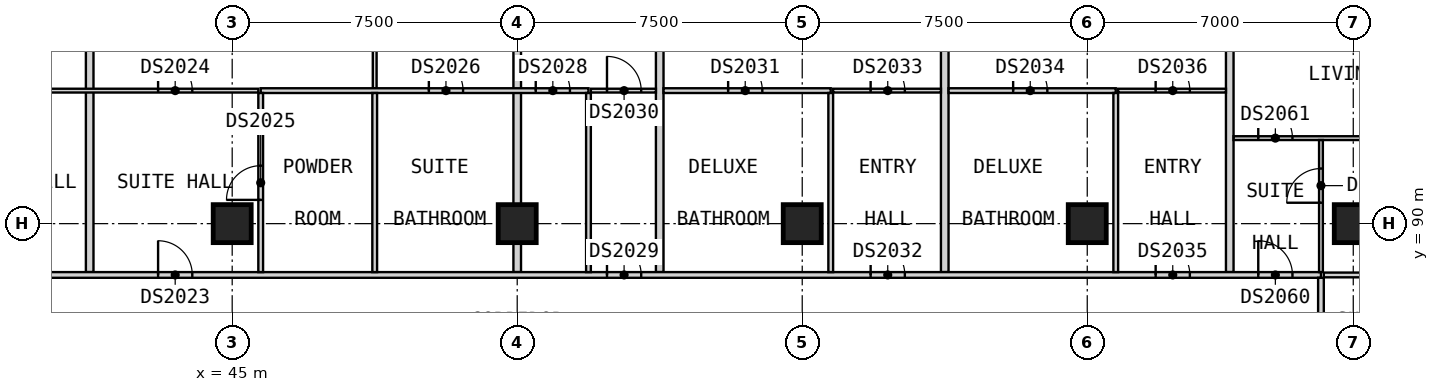
"""IFC4 building model, lengths in metres.
Left out: names, types, materials, properties, quantities, classifications, styles, units other than length and angle.
Written with IfcOpenShell. Run it as: python <this file> out.ifc"""

import sys

from ifc_helpers import new_model, si_unit, direction, frame, frame_2d, origin, origin_2d, place, context, subcontext, project, spatial, rectangle, extrude, element, fill, save


model = new_model("IFC4")
c1 = context("Model", 3, precision=1e-05, world=origin(), true_north=direction((0.0, 1.0)))
c2 = subcontext(c1, "Body", "Model", "MODEL_VIEW")
j1 = project(units=[si_unit("LENGTHUNIT", "METRE"), si_unit("PLANEANGLEUNIT", "RADIAN")], contexts=[c1])
p1 = place(None, origin())
s1 = spatial("IfcSite", under=j1, at=p1, CompositionType="ELEMENT")
p2 = place(p1, origin())
s2 = spatial("IfcBuilding", under=s1, at=p2, CompositionType="ELEMENT")
p3 = place(p2, frame((0.0, 0.0, 133.8)))
s3 = spatial("IfcBuildingStorey", under=s2, at=p3, CompositionType="ELEMENT", Elevation=133.8)
for number, where, z_axis, x_axis in (
    (1, (45.0, 90.0, 0.0), (0.0, 0.0, 1.0), (1.0, 0.0, 0.0)),
    (2, (52.5, 90.0, 0.0), (0.0, 0.0, 1.0), (1.0, 0.0, 0.0)),
    (3, (60.0, 90.0, 0.0), (0.0, 0.0, 1.0), (1.0, 0.0, 0.0)),
    (4, (67.5, 90.0, 0.0), (0.0, 0.0, 1.0), (1.0, 0.0, 0.0)),
    (5, (74.5, 90.0, 0.0), (0.0, 0.0, 1.0), (1.0, 0.0, 0.0)),
):
    element("IfcColumn", number, at=place(p3, frame(where, z_axis=z_axis, x_axis=x_axis)), inside=s3, PredefinedType="COLUMN", context=c2, shape_type="SweptSolid", body=[
        extrude(rectangle(XDim=1.0, YDim=1.0, at=origin_2d()), origin(), (0.0, 0.0, 1.0), 3.6),
    ])
p4 = place(p3, frame((41.25, 88.725, 0.0), z_axis=(0.0, 0.0, 1.0), x_axis=(0.0, 1.0, 0.0)))
e6 = element("IfcWall", 6, at=p4, inside=s3, PredefinedType="PARTITIONING", context=c2, shape_type="SweptSolid", body=[
    extrude(rectangle(XDim=11.715, YDim=0.2, at=frame_2d((5.857, 0.0))), origin(), (0.0, 0.0, 1.0), 3.35),
])
p5 = place(p3, frame((52.5, 88.725, 0.0), z_axis=(0.0, 0.0, 1.0), x_axis=(0.0, 1.0, 0.0)))
e7 = element("IfcWall", 7, at=p5, inside=s3, PredefinedType="PARTITIONING", context=c2, shape_type="SweptSolid", body=[
    extrude(rectangle(XDim=12.525, YDim=0.2, at=frame_2d((6.262, 0.0))), origin(), (0.0, 0.0, 1.0), 3.35),
])
for number, where, z_axis, x_axis in (
    (8, (56.25, 88.725, 0.0), (0.0, 0.0, 1.0), (0.0, 1.0, 0.0)),
    (9, (63.75, 88.725, 0.0), (0.0, 0.0, 1.0), (0.0, 1.0, 0.0)),
    (10, (71.25, 88.725, 0.0), (0.0, 0.0, 1.0), (0.0, 1.0, 0.0)),
):
    element("IfcWall", number, at=place(p3, frame(where, z_axis=z_axis, x_axis=x_axis)), inside=s3, PredefinedType="PARTITIONING", context=c2, shape_type="SweptSolid", body=[
        extrude(rectangle(XDim=11.715, YDim=0.2, at=frame_2d((5.857, 0.0))), origin(), (0.0, 0.0, 1.0), 3.35),
    ])
p6 = place(p3, frame((33.75, 88.65, 0.0), z_axis=(0.0, 0.0, 1.0), x_axis=(1.0, 0.0, 0.0)))
e11 = element("IfcWall", 11, at=p6, inside=s3, PredefinedType="PARTITIONING", context=c2, shape_type="SweptSolid", body=[
    extrude(rectangle(XDim=39.9, YDim=0.15, at=frame_2d((19.95, 0.0))), origin(), (0.0, 0.0, 1.0), 3.35),
])
p7 = place(p6, frame((5.175, 0.0, 0.0)))
e12 = element("IfcOpeningElement", 12, at=p7, cuts=e11, PredefinedType="OPENING", context=c2, shape_type="SweptSolid", body=[
    extrude(rectangle(XDim=0.9, YDim=2.1, at=frame_2d((0.45, 1.05))), frame((0.0, 0.085, 0.0), z_axis=(0.0, -1.0, 0.0), x_axis=(1.0, 0.0, 0.0)), (0.0, 0.0, 1.0), 0.17),
])
p8 = place(p6, frame((9.3, 0.0, 0.0)))
e13 = element("IfcOpeningElement", 13, at=p8, cuts=e11, PredefinedType="OPENING", context=c2, shape_type="SweptSolid", body=[
    extrude(rectangle(XDim=0.9, YDim=2.1, at=frame_2d((0.45, 1.05))), frame((0.0, 0.085, 0.0), z_axis=(0.0, -1.0, 0.0), x_axis=(1.0, 0.0, 0.0)), (0.0, 0.0, 1.0), 0.17),
])
p9 = place(p6, frame((21.113, 0.0, 0.0)))
e14 = element("IfcOpeningElement", 14, at=p9, cuts=e11, PredefinedType="OPENING", context=c2, shape_type="SweptSolid", body=[
    extrude(rectangle(XDim=0.9, YDim=2.1, at=frame_2d((0.45, 1.05))), frame((0.0, 0.085, 0.0), z_axis=(0.0, -1.0, 0.0), x_axis=(1.0, 0.0, 0.0)), (0.0, 0.0, 1.0), 0.17),
])
p10 = place(p6, frame((28.05, 0.0, 0.0)))
e15 = element("IfcOpeningElement", 15, at=p10, cuts=e11, PredefinedType="OPENING", context=c2, shape_type="SweptSolid", body=[
    extrude(rectangle(XDim=0.9, YDim=2.1, at=frame_2d((0.45, 1.05))), frame((0.0, 0.085, 0.0), z_axis=(0.0, -1.0, 0.0), x_axis=(1.0, 0.0, 0.0)), (0.0, 0.0, 1.0), 0.17),
])
p11 = place(p6, frame((35.55, 0.0, 0.0)))
e16 = element("IfcOpeningElement", 16, at=p11, cuts=e11, PredefinedType="OPENING", context=c2, shape_type="SweptSolid", body=[
    extrude(rectangle(XDim=0.9, YDim=2.1, at=frame_2d((0.45, 1.05))), frame((0.0, 0.085, 0.0), z_axis=(0.0, -1.0, 0.0), x_axis=(1.0, 0.0, 0.0)), (0.0, 0.0, 1.0), 0.17),
])
p12 = place(p6, frame((38.25, 0.0, 0.0)))
e17 = element("IfcOpeningElement", 17, at=p12, cuts=e11, PredefinedType="OPENING", context=c2, shape_type="SweptSolid", body=[
    extrude(rectangle(XDim=0.9, YDim=2.1, at=frame_2d((0.45, 1.05))), frame((0.0, 0.085, 0.0), z_axis=(0.0, -1.0, 0.0), x_axis=(1.0, 0.0, 0.0)), (0.0, 0.0, 1.0), 0.17),
])
p13 = place(p3, frame((73.65, 50.175, 0.0), z_axis=(0.0, 0.0, 1.0), x_axis=(0.0, 1.0, 0.0)))
e18 = element("IfcWall", 18, at=p13, inside=s3, PredefinedType="PARTITIONING", context=c2, shape_type="SweptSolid", body=[
    extrude(rectangle(XDim=38.4, YDim=0.15, at=frame_2d((19.2, 0.0))), origin(), (0.0, 0.0, 1.0), 3.35),
])
p14 = place(p13, frame((7.875, 0.0, 0.0)))
e19 = element("IfcOpeningElement", 19, at=p14, cuts=e18, PredefinedType="OPENING", context=c2, shape_type="SweptSolid", body=[
    extrude(rectangle(XDim=0.9, YDim=2.1, at=frame_2d((0.45, 1.05))), frame((0.0, 0.085, 0.0), z_axis=(0.0, -1.0, 0.0), x_axis=(1.0, 0.0, 0.0)), (0.0, 0.0, 1.0), 0.17),
])
p15 = place(p13, frame((12.188, 0.0, 0.0)))
e20 = element("IfcOpeningElement", 20, at=p15, cuts=e18, PredefinedType="OPENING", context=c2, shape_type="SweptSolid", body=[
    extrude(rectangle(XDim=0.9, YDim=2.1, at=frame_2d((0.45, 1.05))), frame((0.0, 0.085, 0.0), z_axis=(0.0, -1.0, 0.0), x_axis=(1.0, 0.0, 0.0)), (0.0, 0.0, 1.0), 0.17),
])
p16 = place(p13, frame((15.375, 0.0, 0.0)))
e21 = element("IfcOpeningElement", 21, at=p16, cuts=e18, PredefinedType="OPENING", context=c2, shape_type="SweptSolid", body=[
    extrude(rectangle(XDim=0.9, YDim=2.1, at=frame_2d((0.45, 1.05))), frame((0.0, 0.085, 0.0), z_axis=(0.0, -1.0, 0.0), x_axis=(1.0, 0.0, 0.0)), (0.0, 0.0, 1.0), 0.17),
])
p17 = place(p13, frame((30.375, 0.0, 0.0)))
e22 = element("IfcOpeningElement", 22, at=p17, cuts=e18, PredefinedType="OPENING", context=c2, shape_type="SweptSolid", body=[
    extrude(rectangle(XDim=0.9, YDim=2.1, at=frame_2d((0.45, 1.05))), frame((0.0, 0.085, 0.0), z_axis=(0.0, -1.0, 0.0), x_axis=(1.0, 0.0, 0.0)), (0.0, 0.0, 1.0), 0.17),
])
p18 = place(p13, frame((34.688, 0.0, 0.0)))
e23 = element("IfcOpeningElement", 23, at=p18, cuts=e18, PredefinedType="OPENING", context=c2, shape_type="SweptSolid", body=[
    extrude(rectangle(XDim=0.9, YDim=2.1, at=frame_2d((0.45, 1.05))), frame((0.0, 0.085, 0.0), z_axis=(0.0, -1.0, 0.0), x_axis=(1.0, 0.0, 0.0)), (0.0, 0.0, 1.0), 0.17),
])
p19 = place(p3, frame((71.35, 92.25, 0.0), z_axis=(0.0, 0.0, 1.0), x_axis=(1.0, 0.0, 0.0)))
e24 = element("IfcWall", 24, at=p19, inside=s3, PredefinedType="PARTITIONING", context=c2, shape_type="SweptSolid", body=[
    extrude(rectangle(XDim=7.35, YDim=0.1, at=frame_2d((3.675, 0.0))), origin(), (0.0, 0.0, 1.0), 3.35),
])
p20 = place(p19, frame((0.65, 0.0, 0.0)))
e25 = element("IfcOpeningElement", 25, at=p20, cuts=e24, PredefinedType="OPENING", context=c2, shape_type="SweptSolid", body=[
    extrude(rectangle(XDim=0.9, YDim=2.1, at=frame_2d((0.45, 1.05))), frame((0.0, 0.06, 0.0), z_axis=(0.0, -1.0, 0.0), x_axis=(1.0, 0.0, 0.0)), (0.0, 0.0, 1.0), 0.12),
])
p21 = place(p3, frame((33.812, 93.5, 0.0), z_axis=(0.0, 0.0, 1.0), x_axis=(1.0, 0.0, 0.0)))
e26 = element("IfcWall", 26, at=p21, inside=s3, PredefinedType="PARTITIONING", context=c2, shape_type="SweptSolid", body=[
    extrude(rectangle(XDim=11.875, YDim=0.1, at=frame_2d((5.938, 0.0))), origin(), (0.0, 0.0, 1.0), 3.35),
])
p22 = place(p21, frame((5.113, 0.0, 0.0)))
e27 = element("IfcOpeningElement", 27, at=p22, cuts=e26, PredefinedType="OPENING", context=c2, shape_type="SweptSolid", body=[
    extrude(rectangle(XDim=0.9, YDim=2.1, at=frame_2d((0.45, 1.05))), frame((0.0, 0.06, 0.0), z_axis=(0.0, -1.0, 0.0), x_axis=(1.0, 0.0, 0.0)), (0.0, 0.0, 1.0), 0.12),
])
p23 = place(p21, frame((9.238, 0.0, 0.0)))
e28 = element("IfcOpeningElement", 28, at=p23, cuts=e26, PredefinedType="OPENING", context=c2, shape_type="SweptSolid", body=[
    extrude(rectangle(XDim=0.9, YDim=2.1, at=frame_2d((0.45, 1.05))), frame((0.0, 0.06, 0.0), z_axis=(0.0, -1.0, 0.0), x_axis=(1.0, 0.0, 0.0)), (0.0, 0.0, 1.0), 0.12),
])
p24 = place(p3, frame((54.438, 93.5, 0.0), z_axis=(0.0, 0.0, 1.0), x_axis=(1.0, 0.0, 0.0)))
e29 = element("IfcWall", 29, at=p24, inside=s3, PredefinedType="PARTITIONING", context=c2, shape_type="SweptSolid", body=[
    extrude(rectangle(XDim=1.712, YDim=0.1, at=frame_2d((0.856, 0.0))), origin(), (0.0, 0.0, 1.0), 3.35),
])
p25 = place(p24, frame((0.425, 0.0, 0.0)))
e30 = element("IfcOpeningElement", 30, at=p25, cuts=e29, PredefinedType="OPENING", context=c2, shape_type="SweptSolid", body=[
    extrude(rectangle(XDim=0.9, YDim=2.1, at=frame_2d((0.45, 1.05))), frame((0.0, 0.06, 0.0), z_axis=(0.0, -1.0, 0.0), x_axis=(1.0, 0.0, 0.0)), (0.0, 0.0, 1.0), 0.12),
])
p26 = place(p3, frame((60.812, 93.5, 0.0), z_axis=(0.0, 0.0, 1.0), x_axis=(1.0, 0.0, 0.0)))
e31 = element("IfcWall", 31, at=p26, inside=s3, PredefinedType="PARTITIONING", context=c2, shape_type="SweptSolid", body=[
    extrude(rectangle(XDim=2.837, YDim=0.1, at=frame_2d((1.419, 0.0))), origin(), (0.0, 0.0, 1.0), 3.35),
])
p27 = place(p26, frame((0.988, 0.0, 0.0)))
e32 = element("IfcOpeningElement", 32, at=p27, cuts=e31, PredefinedType="OPENING", context=c2, shape_type="SweptSolid", body=[
    extrude(rectangle(XDim=0.9, YDim=2.1, at=frame_2d((0.45, 1.05))), frame((0.0, 0.06, 0.0), z_axis=(0.0, -1.0, 0.0), x_axis=(1.0, 0.0, 0.0)), (0.0, 0.0, 1.0), 0.12),
])
p28 = place(p3, frame((68.312, 93.5, 0.0), z_axis=(0.0, 0.0, 1.0), x_axis=(1.0, 0.0, 0.0)))
e33 = element("IfcWall", 33, at=p28, inside=s3, PredefinedType="PARTITIONING", context=c2, shape_type="SweptSolid", body=[
    extrude(rectangle(XDim=2.837, YDim=0.1, at=frame_2d((1.419, 0.0))), origin(), (0.0, 0.0, 1.0), 3.35),
])
p29 = place(p28, frame((0.988, 0.0, 0.0)))
e34 = element("IfcOpeningElement", 34, at=p29, cuts=e33, PredefinedType="OPENING", context=c2, shape_type="SweptSolid", body=[
    extrude(rectangle(XDim=0.9, YDim=2.1, at=frame_2d((0.45, 1.05))), frame((0.0, 0.06, 0.0), z_axis=(0.0, -1.0, 0.0), x_axis=(1.0, 0.0, 0.0)), (0.0, 0.0, 1.0), 0.12),
])
p30 = place(p3, frame((48.75, 93.562, 0.0), z_axis=(0.0, 0.0, 1.0), x_axis=(0.0, 1.0, 0.0)))
e35 = element("IfcWall", 35, at=p30, inside=s3, PredefinedType="PARTITIONING", context=c2, shape_type="SweptSolid", body=[
    extrude(rectangle(XDim=6.877, YDim=0.1, at=frame_2d((3.439, 0.0))), origin(), (0.0, 0.0, 1.0), 3.35),
])
p31 = place(p30, frame((3.363, 0.0, 0.0)))
e36 = element("IfcOpeningElement", 36, at=p31, cuts=e35, PredefinedType="OPENING", context=c2, shape_type="SweptSolid", body=[
    extrude(rectangle(XDim=0.9, YDim=2.1, at=frame_2d((0.45, 1.05))), frame((0.0, 0.06, 0.0), z_axis=(0.0, -1.0, 0.0), x_axis=(1.0, 0.0, 0.0)), (0.0, 0.0, 1.0), 0.12),
])
p32 = place(p3, frame((73.65, 88.725, 0.0), z_axis=(0.0, 0.0, 1.0), x_axis=(0.0, 1.0, 0.0)))
e37 = element("IfcWall", 37, at=p32, inside=s3, PredefinedType="PARTITIONING", context=c2, shape_type="SweptSolid", body=[
    extrude(rectangle(XDim=3.475, YDim=0.1, at=frame_2d((1.737, 0.0))), origin(), (0.0, 0.0, 1.0), 3.35),
])
p33 = place(p32, frame((1.825, 0.0, 0.0)))
e38 = element("IfcOpeningElement", 38, at=p33, cuts=e37, PredefinedType="OPENING", context=c2, shape_type="SweptSolid", body=[
    extrude(rectangle(XDim=0.9, YDim=2.1, at=frame_2d((0.45, 1.05))), frame((0.0, 0.06, 0.0), z_axis=(0.0, -1.0, 0.0), x_axis=(1.0, 0.0, 0.0)), (0.0, 0.0, 1.0), 0.12),
])
p34 = place(p3, frame((73.725, 88.65, 0.0), z_axis=(0.0, 0.0, 1.0), x_axis=(1.0, 0.0, 0.0)))
e39 = element("IfcWall", 39, at=p34, inside=s3, PredefinedType="PARTITIONING", context=c2, shape_type="SweptSolid", body=[
    extrude(rectangle(XDim=5.025, YDim=0.125, at=frame_2d((2.512, 0.0))), origin(), (0.0, 0.0, 1.0), 3.35),
])
p35 = place(p3, frame((45.75, 93.5, 0.0), z_axis=(0.0, 0.0, 1.0), x_axis=(1.0, 0.0, 0.0)))
e40 = element("IfcWall", 40, at=p35, inside=s3, PredefinedType="PARTITIONING", context=c2, shape_type="SweptSolid", body=[
    extrude(rectangle(XDim=8.625, YDim=0.125, at=frame_2d((4.312, 0.0))), origin(), (0.0, 0.0, 1.0), 3.35),
])
p36 = place(p35, frame((4.425, 0.0, 0.0)))
e41 = element("IfcOpeningElement", 41, at=p36, cuts=e40, PredefinedType="OPENING", context=c2, shape_type="SweptSolid", body=[
    extrude(rectangle(XDim=0.9, YDim=2.1, at=frame_2d((0.45, 1.05))), frame((0.0, 0.073, 0.0), z_axis=(0.0, -1.0, 0.0), x_axis=(1.0, 0.0, 0.0)), (0.0, 0.0, 1.0), 0.145),
])
p37 = place(p35, frame((7.238, 0.0, 0.0)))
e42 = element("IfcOpeningElement", 42, at=p37, cuts=e40, PredefinedType="OPENING", context=c2, shape_type="SweptSolid", body=[
    extrude(rectangle(XDim=0.9, YDim=2.1, at=frame_2d((0.45, 1.05))), frame((0.0, 0.073, 0.0), z_axis=(0.0, -1.0, 0.0), x_axis=(1.0, 0.0, 0.0)), (0.0, 0.0, 1.0), 0.145),
])
p38 = place(p3, frame((56.35, 93.5, 0.0), z_axis=(0.0, 0.0, 1.0), x_axis=(1.0, 0.0, 0.0)))
e43 = element("IfcWall", 43, at=p38, inside=s3, PredefinedType="PARTITIONING", context=c2, shape_type="SweptSolid", body=[
    extrude(rectangle(XDim=4.4, YDim=0.125, at=frame_2d((2.2, 0.0))), origin(), (0.0, 0.0, 1.0), 3.35),
])
p39 = place(p38, frame((1.7, 0.0, 0.0)))
e44 = element("IfcOpeningElement", 44, at=p39, cuts=e43, PredefinedType="OPENING", context=c2, shape_type="SweptSolid", body=[
    extrude(rectangle(XDim=0.9, YDim=2.1, at=frame_2d((0.45, 1.05))), frame((0.0, 0.073, 0.0), z_axis=(0.0, -1.0, 0.0), x_axis=(1.0, 0.0, 0.0)), (0.0, 0.0, 1.0), 0.145),
])
p40 = place(p3, frame((63.85, 93.5, 0.0), z_axis=(0.0, 0.0, 1.0), x_axis=(1.0, 0.0, 0.0)))
e45 = element("IfcWall", 45, at=p40, inside=s3, PredefinedType="PARTITIONING", context=c2, shape_type="SweptSolid", body=[
    extrude(rectangle(XDim=4.4, YDim=0.125, at=frame_2d((2.2, 0.0))), origin(), (0.0, 0.0, 1.0), 3.35),
])
p41 = place(p40, frame((1.7, 0.0, 0.0)))
e46 = element("IfcOpeningElement", 46, at=p41, cuts=e45, PredefinedType="OPENING", context=c2, shape_type="SweptSolid", body=[
    extrude(rectangle(XDim=0.9, YDim=2.1, at=frame_2d((0.45, 1.05))), frame((0.0, 0.073, 0.0), z_axis=(0.0, -1.0, 0.0), x_axis=(1.0, 0.0, 0.0)), (0.0, 0.0, 1.0), 0.145),
])
p42 = place(p3, frame((45.75, 88.725, 0.0), z_axis=(0.0, 0.0, 1.0), x_axis=(0.0, 1.0, 0.0)))
e47 = element("IfcWall", 47, at=p42, inside=s3, PredefinedType="PARTITIONING", context=c2, shape_type="SweptSolid", body=[
    extrude(rectangle(XDim=4.712, YDim=0.125, at=frame_2d((2.356, 0.0))), origin(), (0.0, 0.0, 1.0), 3.35),
])
p43 = place(p42, frame((1.9, 0.0, 0.0)))
e48 = element("IfcOpeningElement", 48, at=p43, cuts=e47, PredefinedType="OPENING", context=c2, shape_type="SweptSolid", body=[
    extrude(rectangle(XDim=0.9, YDim=2.1, at=frame_2d((0.45, 1.05))), frame((0.0, 0.073, 0.0), z_axis=(0.0, -1.0, 0.0), x_axis=(1.0, 0.0, 0.0)), (0.0, 0.0, 1.0), 0.145),
])
for number, where, z_axis, x_axis in (
    (49, (48.75, 88.725, 0.0), (0.0, 0.0, 1.0), (0.0, 1.0, 0.0)),
    (50, (54.375, 88.725, 0.0), (0.0, 0.0, 1.0), (0.0, 1.0, 0.0)),
    (51, (60.75, 88.725, 0.0), (0.0, 0.0, 1.0), (0.0, 1.0, 0.0)),
    (52, (68.25, 88.725, 0.0), (0.0, 0.0, 1.0), (0.0, 1.0, 0.0)),
):
    element("IfcWall", number, at=place(p3, frame(where, z_axis=z_axis, x_axis=x_axis)), inside=s3, PredefinedType="PARTITIONING", context=c2, shape_type="SweptSolid", body=[
        extrude(rectangle(XDim=4.712, YDim=0.125, at=frame_2d((2.356, 0.0))), origin(), (0.0, 0.0, 1.0), 3.35),
    ])
p44 = place(p8, origin())
e53 = element("IfcDoor", 53, at=p44, inside=s3, OperationType="SINGLE_SWING_LEFT", PredefinedType="DOOR", context=c2, shape_type="SweptSolid", body=[
    extrude(rectangle(XDim=0.9, YDim=2.1, at=frame_2d((0.45, 1.05))), frame((0.0, 0.025, 0.0), z_axis=(0.0, -1.0, 0.0), x_axis=(1.0, 0.0, 0.0)), (0.0, 0.0, 1.0), 0.05),
])
fill(e13, e53)
p45 = place(p23, origin())
e54 = element("IfcDoor", 54, at=p45, inside=s3, OperationType="SINGLE_SWING_RIGHT", PredefinedType="DOOR", context=c2, shape_type="SweptSolid", body=[
    extrude(rectangle(XDim=0.9, YDim=2.1, at=frame_2d((0.45, 1.05))), frame((0.0, 0.025, 0.0), z_axis=(0.0, -1.0, 0.0), x_axis=(1.0, 0.0, 0.0)), (0.0, 0.0, 1.0), 0.05),
])
fill(e28, e54)
p46 = place(p43, origin())
e55 = element("IfcDoor", 55, at=p46, inside=s3, OperationType="SINGLE_SWING_LEFT", PredefinedType="DOOR", context=c2, shape_type="SweptSolid", body=[
    extrude(rectangle(XDim=0.9, YDim=2.1, at=frame_2d((0.45, 1.05))), frame((0.0, 0.025, 0.0), z_axis=(0.0, -1.0, 0.0), x_axis=(1.0, 0.0, 0.0)), (0.0, 0.0, 1.0), 0.05),
])
fill(e48, e55)
p47 = place(p36, origin())
e56 = element("IfcDoor", 56, at=p47, inside=s3, OperationType="SINGLE_SWING_RIGHT", PredefinedType="DOOR", context=c2, shape_type="SweptSolid", body=[
    extrude(rectangle(XDim=0.9, YDim=2.1, at=frame_2d((0.45, 1.05))), frame((0.0, 0.025, 0.0), z_axis=(0.0, -1.0, 0.0), x_axis=(1.0, 0.0, 0.0)), (0.0, 0.0, 1.0), 0.05),
])
fill(e41, e56)
p48 = place(p37, origin())
e57 = element("IfcDoor", 57, at=p48, inside=s3, OperationType="SINGLE_SWING_RIGHT", PredefinedType="DOOR", context=c2, shape_type="SweptSolid", body=[
    extrude(rectangle(XDim=0.9, YDim=2.1, at=frame_2d((0.45, 1.05))), frame((0.0, 0.025, 0.0), z_axis=(0.0, -1.0, 0.0), x_axis=(1.0, 0.0, 0.0)), (0.0, 0.0, 1.0), 0.05),
])
fill(e42, e57)
p49 = place(p9, origin())
e58 = element("IfcDoor", 58, at=p49, inside=s3, OperationType="SINGLE_SWING_LEFT", PredefinedType="DOOR", context=c2, shape_type="SweptSolid", body=[
    extrude(rectangle(XDim=0.9, YDim=2.1, at=frame_2d((0.45, 1.05))), frame((0.0, 0.025, 0.0), z_axis=(0.0, -1.0, 0.0), x_axis=(1.0, 0.0, 0.0)), (0.0, 0.0, 1.0), 0.05),
])
fill(e14, e58)
p50 = place(p25, origin())
e59 = element("IfcDoor", 59, at=p50, inside=s3, OperationType="SINGLE_SWING_RIGHT", PredefinedType="DOOR", context=c2, shape_type="SweptSolid", body=[
    extrude(rectangle(XDim=0.9, YDim=2.1, at=frame_2d((0.45, 1.05))), frame((0.0, 0.025, 0.0), z_axis=(0.0, -1.0, 0.0), x_axis=(1.0, 0.0, 0.0)), (0.0, 0.0, 1.0), 0.05),
])
fill(e30, e59)
p51 = place(p39, origin())
e60 = element("IfcDoor", 60, at=p51, inside=s3, OperationType="SINGLE_SWING_RIGHT", PredefinedType="DOOR", context=c2, shape_type="SweptSolid", body=[
    extrude(rectangle(XDim=0.9, YDim=2.1, at=frame_2d((0.45, 1.05))), frame((0.0, 0.025, 0.0), z_axis=(0.0, -1.0, 0.0), x_axis=(1.0, 0.0, 0.0)), (0.0, 0.0, 1.0), 0.05),
])
fill(e44, e60)
p52 = place(p10, origin())
e61 = element("IfcDoor", 61, at=p52, inside=s3, OperationType="SINGLE_SWING_LEFT", PredefinedType="DOOR", context=c2, shape_type="SweptSolid", body=[
    extrude(rectangle(XDim=0.9, YDim=2.1, at=frame_2d((0.45, 1.05))), frame((0.0, 0.025, 0.0), z_axis=(0.0, -1.0, 0.0), x_axis=(1.0, 0.0, 0.0)), (0.0, 0.0, 1.0), 0.05),
])
fill(e15, e61)
p53 = place(p27, origin())
e62 = element("IfcDoor", 62, at=p53, inside=s3, OperationType="SINGLE_SWING_RIGHT", PredefinedType="DOOR", context=c2, shape_type="SweptSolid", body=[
    extrude(rectangle(XDim=0.9, YDim=2.1, at=frame_2d((0.45, 1.05))), frame((0.0, 0.025, 0.0), z_axis=(0.0, -1.0, 0.0), x_axis=(1.0, 0.0, 0.0)), (0.0, 0.0, 1.0), 0.05),
])
fill(e32, e62)
p54 = place(p41, origin())
e63 = element("IfcDoor", 63, at=p54, inside=s3, OperationType="SINGLE_SWING_RIGHT", PredefinedType="DOOR", context=c2, shape_type="SweptSolid", body=[
    extrude(rectangle(XDim=0.9, YDim=2.1, at=frame_2d((0.45, 1.05))), frame((0.0, 0.025, 0.0), z_axis=(0.0, -1.0, 0.0), x_axis=(1.0, 0.0, 0.0)), (0.0, 0.0, 1.0), 0.05),
])
fill(e46, e63)
p55 = place(p11, origin())
e64 = element("IfcDoor", 64, at=p55, inside=s3, OperationType="SINGLE_SWING_LEFT", PredefinedType="DOOR", context=c2, shape_type="SweptSolid", body=[
    extrude(rectangle(XDim=0.9, YDim=2.1, at=frame_2d((0.45, 1.05))), frame((0.0, 0.025, 0.0), z_axis=(0.0, -1.0, 0.0), x_axis=(1.0, 0.0, 0.0)), (0.0, 0.0, 1.0), 0.05),
])
fill(e16, e64)
p56 = place(p29, origin())
e65 = element("IfcDoor", 65, at=p56, inside=s3, OperationType="SINGLE_SWING_RIGHT", PredefinedType="DOOR", context=c2, shape_type="SweptSolid", body=[
    extrude(rectangle(XDim=0.9, YDim=2.1, at=frame_2d((0.45, 1.05))), frame((0.0, 0.025, 0.0), z_axis=(0.0, -1.0, 0.0), x_axis=(1.0, 0.0, 0.0)), (0.0, 0.0, 1.0), 0.05),
])
fill(e34, e65)
p57 = place(p12, origin())
e66 = element("IfcDoor", 66, at=p57, inside=s3, OperationType="SINGLE_SWING_RIGHT", PredefinedType="DOOR", context=c2, shape_type="SweptSolid", body=[
    extrude(rectangle(XDim=0.9, YDim=2.1, at=frame_2d((0.45, 1.05))), frame((0.0, 0.025, 0.0), z_axis=(0.0, -1.0, 0.0), x_axis=(1.0, 0.0, 0.0)), (0.0, 0.0, 1.0), 0.05),
])
fill(e17, e66)
p58 = place(p20, origin())
e67 = element("IfcDoor", 67, at=p58, inside=s3, OperationType="SINGLE_SWING_LEFT", PredefinedType="DOOR", context=c2, shape_type="SweptSolid", body=[
    extrude(rectangle(XDim=0.9, YDim=2.1, at=frame_2d((0.45, 1.05))), frame((0.0, 0.025, 0.0), z_axis=(0.0, -1.0, 0.0), x_axis=(1.0, 0.0, 0.0)), (0.0, 0.0, 1.0), 0.05),
])
fill(e25, e67)
p59 = place(p33, origin())
e68 = element("IfcDoor", 68, at=p59, inside=s3, OperationType="SINGLE_SWING_RIGHT", PredefinedType="DOOR", context=c2, shape_type="SweptSolid", body=[
    extrude(rectangle(XDim=0.9, YDim=2.1, at=frame_2d((0.45, 1.05))), frame((0.0, 0.025, 0.0), z_axis=(0.0, -1.0, 0.0), x_axis=(1.0, 0.0, 0.0)), (0.0, 0.0, 1.0), 0.05),
])
fill(e38, e68)
save(model, sys.argv[1])
